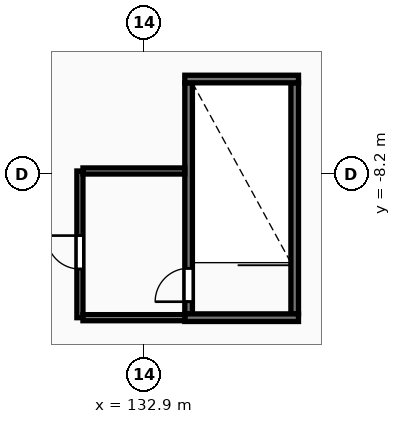
"""IFC4 building model, lengths in metres.
Left out: names, types, materials, properties, quantities, classifications, styles, units other than length and angle.
Written with IfcOpenShell. Run it as: python <this file> out.ifc"""

import sys

from ifc_helpers import new_model, si_unit, direction, frame, frame_2d, origin, place, context, subcontext, project, spatial, rectangle, extrude, element, fill, save


model = new_model("IFC4")
c1 = context("Model", 3, precision=1e-05, world=origin(), true_north=direction((0.0, 1.0)))
c2 = subcontext(c1, "Body", "Model", "MODEL_VIEW")
j1 = project(units=[si_unit("LENGTHUNIT", "METRE"), si_unit("PLANEANGLEUNIT", "RADIAN")], contexts=[c1])
p1 = place(None, origin())
s1 = spatial("IfcSite", under=j1, at=p1, CompositionType="ELEMENT")
p2 = place(p1, origin())
s2 = spatial("IfcBuilding", under=s1, at=p2, CompositionType="ELEMENT")
p3 = place(p2, frame((0.0, 0.0, 19.0)))
s3 = spatial("IfcBuildingStorey", under=s2, at=p3, CompositionType="ELEMENT", Elevation=19.0)
p4 = place(p3, frame((134.375, -12.8, 0.0), z_axis=(0.0, 0.0, 1.0), x_axis=(0.0, 1.0, 0.0)))
e1 = element("IfcWall", 1, at=p4, inside=s3, PredefinedType="SHEAR", context=c2, shape_type="SweptSolid", body=[
    extrude(rectangle(XDim=7.6, YDim=0.25, at=frame_2d((3.8, 0.0))), origin(), (0.0, 0.0, 1.0), 5.0),
])
p5 = place(p4, frame((0.4, 0.0, 0.0)))
e2 = element("IfcOpeningElement", 2, at=p5, cuts=e1, PredefinedType="OPENING", context=c2, shape_type="SweptSolid", body=[
    extrude(rectangle(XDim=1.1, YDim=2.1, at=frame_2d((0.55, 1.05))), frame((0.0, 0.135, 0.0), z_axis=(0.0, -1.0, 0.0), x_axis=(1.0, 0.0, 0.0)), (0.0, 0.0, 1.0), 0.27),
])
p6 = place(p3, frame((137.865, -12.8, 0.0), z_axis=(0.0, 0.0, 1.0), x_axis=(0.0, 1.0, 0.0)))
e3 = element("IfcWall", 3, at=p6, inside=s3, PredefinedType="SHEAR", context=c2, shape_type="SweptSolid", body=[
    extrude(rectangle(XDim=7.6, YDim=0.25, at=frame_2d((3.8, 0.0))), origin(), (0.0, 0.0, 1.0), 5.0),
])
for number, where, z_axis, x_axis in (
    (4, (134.25, -12.925, 0.0), (0.0, 0.0, 1.0), (1.0, 0.0, 0.0)),
    (5, (134.25, -5.075, 0.0), (0.0, 0.0, 1.0), (1.0, 0.0, 0.0)),
):
    element("IfcWall", number, at=place(p3, frame(where, z_axis=z_axis, x_axis=x_axis)), inside=s3, PredefinedType="SHEAR", context=c2, shape_type="SweptSolid", body=[
        extrude(rectangle(XDim=3.74, YDim=0.25, at=frame_2d((1.87, 0.0))), origin(), (0.0, 0.0, 1.0), 5.0),
    ])
p7 = place(p3, frame((130.8, -12.925, 0.0), z_axis=(0.0, 0.0, 1.0), x_axis=(0.0, 1.0, 0.0)))
e6 = element("IfcWall", 6, at=p7, inside=s3, PredefinedType="PARTITIONING", context=c2, shape_type="SweptSolid", body=[
    extrude(rectangle(XDim=4.825, YDim=0.2, at=frame_2d((2.413, 0.0))), origin(), (0.0, 0.0, 1.0), 4.68),
])
p8 = place(p7, frame((1.6, 0.0, 0.0)))
e7 = element("IfcOpeningElement", 7, at=p8, cuts=e6, PredefinedType="OPENING", context=c2, shape_type="SweptSolid", body=[
    extrude(rectangle(XDim=1.1, YDim=2.15, at=frame_2d((0.55, 1.075))), frame((0.0, 0.11, 0.0), z_axis=(0.0, -1.0, 0.0), x_axis=(1.0, 0.0, 0.0)), (0.0, 0.0, 1.0), 0.22),
])
for number, where, z_axis, x_axis in (
    (8, (130.9, -12.925, 0.0), (0.0, 0.0, 1.0), (1.0, 0.0, 0.0)),
    (9, (130.9, -8.1, 0.0), (0.0, 0.0, 1.0), (1.0, 0.0, 0.0)),
):
    element("IfcWall", number, at=place(p3, frame(where, z_axis=z_axis, x_axis=x_axis)), inside=s3, PredefinedType="PARTITIONING", context=c2, shape_type="SweptSolid", body=[
        extrude(rectangle(XDim=3.35, YDim=0.2, at=frame_2d((1.675, 0.0))), origin(), (0.0, 0.0, 1.0), 4.68),
    ])
p9 = place(p5, origin())
e10 = element("IfcDoor", 10, at=p9, inside=s3, OperationType="SINGLE_SWING_LEFT", PredefinedType="DOOR", context=c2, shape_type="SweptSolid", body=[
    extrude(rectangle(XDim=1.1, YDim=2.1, at=frame_2d((0.55, 1.05))), frame((0.0, 0.025, 0.0), z_axis=(0.0, -1.0, 0.0), x_axis=(1.0, 0.0, 0.0)), (0.0, 0.0, 1.0), 0.05),
])
fill(e2, e10)
p10 = place(p8, origin())
e11 = element("IfcDoor", 11, at=p10, inside=s3, OperationType="SINGLE_SWING_RIGHT", PredefinedType="DOOR", context=c2, shape_type="SweptSolid", body=[
    extrude(rectangle(XDim=1.1, YDim=2.15, at=frame_2d((0.55, 1.075))), frame((0.0, 0.025, 0.0), z_axis=(0.0, -1.0, 0.0), x_axis=(1.0, 0.0, 0.0)), (0.0, 0.0, 1.0), 0.05),
])
fill(e7, e11)
save(model, sys.argv[1])
